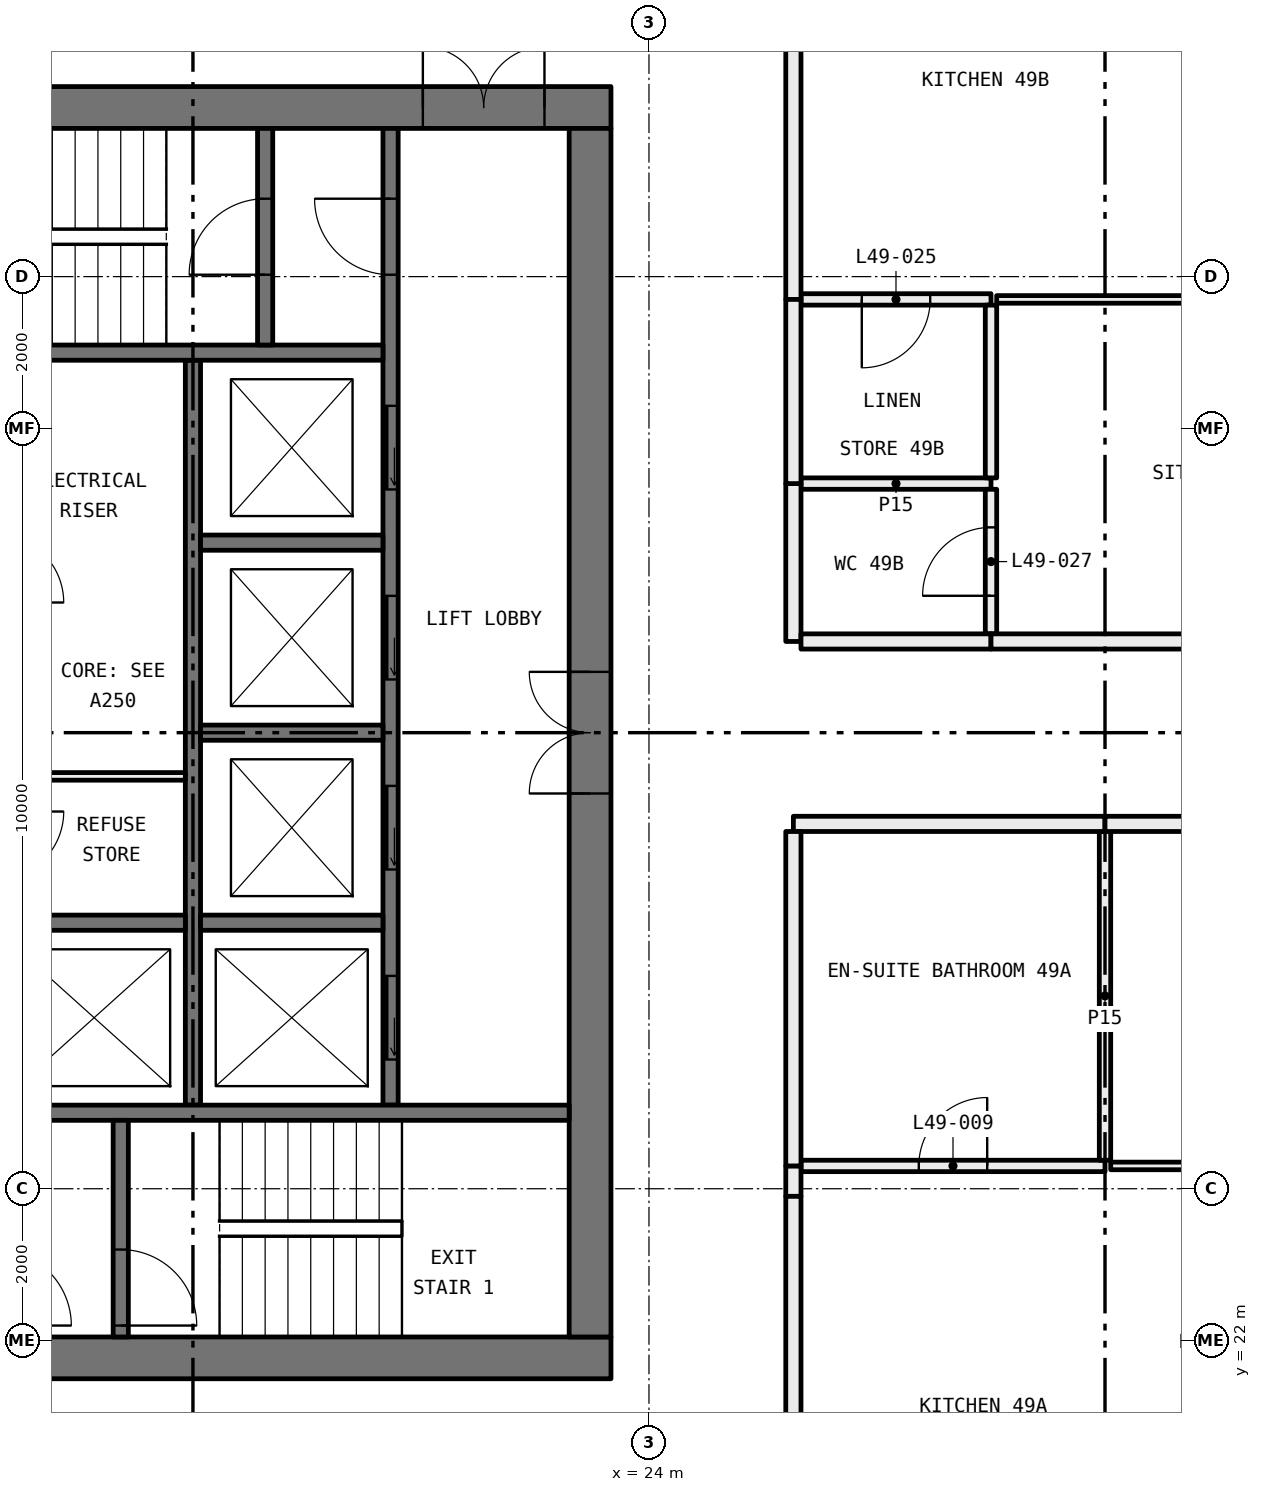
"""IFC4 building model, lengths in metres.
Left out: names, types, materials, properties, quantities, classifications, styles, units other than length and angle.
Written with IfcOpenShell. Run it as: python <this file> out.ifc"""

import sys

from ifc_helpers import new_model, si_unit, direction, frame, frame_2d, origin, place, context, subcontext, project, spatial, rectangle, extrude, element, fill, save


model = new_model("IFC4")
c1 = context("Model", 3, precision=1e-05, world=origin(), true_north=direction((0.0, 1.0)))
c2 = subcontext(c1, "Body", "Model", "MODEL_VIEW")
j1 = project(units=[si_unit("LENGTHUNIT", "METRE"), si_unit("PLANEANGLEUNIT", "RADIAN")], contexts=[c1])
p1 = place(None, origin())
s1 = spatial("IfcSite", under=j1, at=p1, CompositionType="ELEMENT")
p2 = place(p1, origin())
s2 = spatial("IfcBuilding", under=s1, at=p2, CompositionType="ELEMENT")
p3 = place(p2, frame((0.0, 0.0, 185.85)))
s3 = spatial("IfcBuildingStorey", under=s2, at=p3, CompositionType="ELEMENT", Elevation=185.85)
p4 = place(p3, frame((30.0, 24.3, 0.0), z_axis=(0.0, 0.0, 1.0), x_axis=(-1.0, 0.0, 0.0)))
e1 = element("IfcWall", 1, at=p4, inside=s3, PredefinedType="PARTITIONING", context=c2, shape_type="SweptSolid", body=[
    extrude(rectangle(XDim=4.0, YDim=0.15, at=frame_2d((2.0, 0.0))), origin(), (0.0, 0.0, 1.0), 3.05),
])
p5 = place(p4, frame((1.55, 0.0, 0.0)))
e2 = element("IfcOpeningElement", 2, at=p5, cuts=e1, PredefinedType="OPENING", context=c2, shape_type="SweptSolid", body=[
    extrude(rectangle(XDim=0.9, YDim=2.1, at=frame_2d((0.45, 1.05))), frame((0.0, 0.085, 0.0), z_axis=(0.0, -1.0, 0.0), x_axis=(1.0, 0.0, 0.0)), (0.0, 0.0, 1.0), 0.17),
])
p6 = place(p3, frame((31.45, 24.3, 0.0), z_axis=(0.0, 0.0, 1.0), x_axis=(-1.0, 0.0, 0.0)))
e3 = element("IfcWall", 3, at=p6, inside=s3, PredefinedType="PARTITIONING", context=c2, shape_type="SweptSolid", body=[
    extrude(rectangle(XDim=1.375, YDim=0.1, at=frame_2d((0.688, 0.0))), origin(), (0.0, 0.0, 1.0), 3.05),
])
p7 = place(p3, frame((25.9, 24.3, 0.0), z_axis=(0.0, 0.0, 1.0), x_axis=(0.0, -1.0, 0.0)))
e4 = element("IfcWall", 4, at=p7, inside=s3, PredefinedType="PARTITIONING", context=c2, shape_type="SweptSolid", body=[
    extrude(rectangle(XDim=0.4, YDim=0.2, at=frame_2d((0.2, 0.0))), origin(), (0.0, 0.0, 1.0), 2.45),
])
p8 = place(p3, frame((25.9, 23.9, 0.0), z_axis=(0.0, 0.0, 1.0), x_axis=(0.0, -1.0, 0.0)))
e5 = element("IfcWall", 5, at=p8, inside=s3, PredefinedType="PARTITIONING", context=c2, shape_type="SweptSolid", body=[
    extrude(rectangle(XDim=5.8, YDim=0.2, at=frame_2d((2.9, 0.0))), origin(), (0.0, 0.0, 1.0), 3.05),
])
p9 = place(p3, frame((30.0, 24.375, 0.0), z_axis=(0.0, 0.0, 1.0), x_axis=(0.0, 1.0, 0.0)))
e6 = element("IfcWall", 6, at=p9, inside=s3, PredefinedType="PARTITIONING", context=c2, shape_type="SweptSolid", body=[
    extrude(rectangle(XDim=4.325, YDim=0.15, at=frame_2d((2.163, 0.0))), origin(), (0.0, 0.0, 1.0), 3.05),
])
p10 = place(p3, frame((30.0, 28.8, 0.0), z_axis=(0.0, 0.0, 1.0), x_axis=(-1.0, 0.0, 0.0)))
e7 = element("IfcWall", 7, at=p10, inside=s3, PredefinedType="PARTITIONING", context=c2, shape_type="SweptSolid", body=[
    extrude(rectangle(XDim=4.1, YDim=0.2, at=frame_2d((2.05, 0.0))), origin(), (0.0, 0.0, 1.0), 3.05),
])
p11 = place(p3, frame((25.9, 28.7, 0.0), z_axis=(0.0, 0.0, 1.0), x_axis=(0.0, -1.0, 0.0)))
e8 = element("IfcWall", 8, at=p11, inside=s3, PredefinedType="PARTITIONING", context=c2, shape_type="SweptSolid", body=[
    extrude(rectangle(XDim=4.4, YDim=0.2, at=frame_2d((2.2, 0.0))), origin(), (0.0, 0.0, 1.0), 3.05),
])
p12 = place(p3, frame((35.9, 28.8, 0.0), z_axis=(0.0, 0.0, 1.0), x_axis=(-1.0, 0.0, 0.0)))
e9 = element("IfcWall", 9, at=p12, inside=s3, PredefinedType="PARTITIONING", context=c2, shape_type="SweptSolid", body=[
    extrude(rectangle(XDim=5.9, YDim=0.2, at=frame_2d((2.95, 0.0))), origin(), (0.0, 0.0, 1.0), 3.05),
])
p13 = place(p3, frame((26.0, 35.7, 0.0), z_axis=(0.0, 0.0, 1.0), x_axis=(1.0, 0.0, 0.0)))
e10 = element("IfcWall", 10, at=p13, inside=s3, PredefinedType="PARTITIONING", context=c2, shape_type="SweptSolid", body=[
    extrude(rectangle(XDim=2.5, YDim=0.15, at=frame_2d((1.25, 0.0))), origin(), (0.0, 0.0, 1.0), 3.05),
])
p14 = place(p13, frame((0.8, 0.0, 0.0)))
e11 = element("IfcOpeningElement", 11, at=p14, cuts=e10, PredefinedType="OPENING", context=c2, shape_type="SweptSolid", body=[
    extrude(rectangle(XDim=0.9, YDim=2.1, at=frame_2d((0.45, 1.05))), frame((0.0, 0.085, 0.0), z_axis=(0.0, -1.0, 0.0), x_axis=(1.0, 0.0, 0.0)), (0.0, 0.0, 1.0), 0.17),
])
p15 = place(p3, frame((28.575, 35.7, 0.0), z_axis=(0.0, 0.0, 1.0), x_axis=(1.0, 0.0, 0.0)))
e12 = element("IfcWall", 12, at=p15, inside=s3, PredefinedType="PARTITIONING", context=c2, shape_type="SweptSolid", body=[
    extrude(rectangle(XDim=2.875, YDim=0.1, at=frame_2d((1.438, 0.0))), origin(), (0.0, 0.0, 1.0), 3.05),
])
p16 = place(p3, frame((25.9, 41.9, 0.0), z_axis=(0.0, 0.0, 1.0), x_axis=(0.0, -1.0, 0.0)))
e13 = element("IfcWall", 13, at=p16, inside=s3, PredefinedType="PARTITIONING", context=c2, shape_type="SweptSolid", body=[
    extrude(rectangle(XDim=6.2, YDim=0.2, at=frame_2d((3.1, 0.0))), origin(), (0.0, 0.0, 1.0), 2.45),
])
p17 = place(p3, frame((28.5, 33.277, 0.0), z_axis=(0.0, 0.0, 1.0), x_axis=(-1.0, 0.0, 0.0)))
e14 = element("IfcWall", 14, at=p17, inside=s3, PredefinedType="PARTITIONING", context=c2, shape_type="SweptSolid", body=[
    extrude(rectangle(XDim=2.5, YDim=0.15, at=frame_2d((1.25, 0.0))), origin(), (0.0, 0.0, 1.0), 3.05),
])
p18 = place(p3, frame((28.5, 31.3, 0.0), z_axis=(0.0, 0.0, 1.0), x_axis=(0.0, 1.0, 0.0)))
e15 = element("IfcWall", 15, at=p18, inside=s3, PredefinedType="PARTITIONING", context=c2, shape_type="SweptSolid", body=[
    extrude(rectangle(XDim=1.902, YDim=0.15, at=frame_2d((0.951, 0.0))), origin(), (0.0, 0.0, 1.0), 3.05),
])
p19 = place(p18, frame((0.501, 0.0, 0.0)))
e16 = element("IfcOpeningElement", 16, at=p19, cuts=e15, PredefinedType="OPENING", context=c2, shape_type="SweptSolid", body=[
    extrude(rectangle(XDim=0.9, YDim=2.1, at=frame_2d((0.45, 1.05))), frame((0.0, 0.085, 0.0), z_axis=(0.0, -1.0, 0.0), x_axis=(1.0, 0.0, 0.0)), (0.0, 0.0, 1.0), 0.17),
])
p20 = place(p3, frame((25.9, 33.277, 0.0), z_axis=(0.0, 0.0, 1.0), x_axis=(0.0, -1.0, 0.0)))
e17 = element("IfcWall", 17, at=p20, inside=s3, PredefinedType="PARTITIONING", context=c2, shape_type="SweptSolid", body=[
    extrude(rectangle(XDim=2.077, YDim=0.2, at=frame_2d((1.039, 0.0))), origin(), (0.0, 0.0, 1.0), 3.05),
])
p21 = place(p3, frame((26.0, 31.2, 0.0), z_axis=(0.0, 0.0, 1.0), x_axis=(1.0, 0.0, 0.0)))
e18 = element("IfcWall", 18, at=p21, inside=s3, PredefinedType="PARTITIONING", context=c2, shape_type="SweptSolid", body=[
    extrude(rectangle(XDim=2.5, YDim=0.2, at=frame_2d((1.25, 0.0))), origin(), (0.0, 0.0, 1.0), 3.05),
])
p22 = place(p3, frame((28.5, 33.352, 0.0), z_axis=(0.0, 0.0, 1.0), x_axis=(0.0, 1.0, 0.0)))
e19 = element("IfcWall", 19, at=p22, inside=s3, PredefinedType="PARTITIONING", context=c2, shape_type="SweptSolid", body=[
    extrude(rectangle(XDim=2.273, YDim=0.15, at=frame_2d((1.136, 0.0))), origin(), (0.0, 0.0, 1.0), 3.05),
])
p23 = place(p3, frame((25.9, 35.7, 0.0), z_axis=(0.0, 0.0, 1.0), x_axis=(0.0, -1.0, 0.0)))
e20 = element("IfcWall", 20, at=p23, inside=s3, PredefinedType="PARTITIONING", context=c2, shape_type="SweptSolid", body=[
    extrude(rectangle(XDim=2.423, YDim=0.2, at=frame_2d((1.211, 0.0))), origin(), (0.0, 0.0, 1.0), 3.05),
])
p24 = place(p3, frame((28.5, 31.2, 0.0), z_axis=(0.0, 0.0, 1.0), x_axis=(1.0, 0.0, 0.0)))
e21 = element("IfcWall", 21, at=p24, inside=s3, PredefinedType="PARTITIONING", context=c2, shape_type="SweptSolid", body=[
    extrude(rectangle(XDim=7.6, YDim=0.2, at=frame_2d((3.8, 0.0))), origin(), (0.0, 0.0, 1.0), 2.45),
])
p25 = place(p3, frame((12.5, 21.775, 0.0), z_axis=(0.0, 0.0, 1.0), x_axis=(1.0, 0.0, 0.0)))
e22 = element("IfcWall", 22, at=p25, inside=s3, PredefinedType="SHEAR", context=c2, shape_type="SweptSolid", body=[
    extrude(rectangle(XDim=11.0, YDim=0.55, at=frame_2d((5.5, 0.0))), origin(), (0.0, 0.0, 1.0), 3.05),
])
p26 = place(p3, frame((12.5, 38.225, 0.0), z_axis=(0.0, 0.0, 1.0), x_axis=(1.0, 0.0, 0.0)))
e23 = element("IfcWall", 23, at=p26, inside=s3, PredefinedType="SHEAR", context=c2, shape_type="SweptSolid", body=[
    extrude(rectangle(XDim=11.0, YDim=0.55, at=frame_2d((5.5, 0.0))), origin(), (0.0, 0.0, 1.0), 3.05),
])
p27 = place(p26, frame((8.525, 0.0, 0.0)))
e24 = element("IfcOpeningElement", 24, at=p27, cuts=e23, PredefinedType="OPENING", context=c2, shape_type="SweptSolid", body=[
    extrude(rectangle(XDim=1.6, YDim=2.1, at=frame_2d((0.8, 1.05))), frame((0.0, 0.285, 0.0), z_axis=(0.0, -1.0, 0.0), x_axis=(1.0, 0.0, 0.0)), (0.0, 0.0, 1.0), 0.57),
])
p28 = place(p3, frame((23.225, 22.05, 0.0), z_axis=(0.0, 0.0, 1.0), x_axis=(0.0, 1.0, 0.0)))
e25 = element("IfcWall", 25, at=p28, inside=s3, PredefinedType="SHEAR", context=c2, shape_type="SweptSolid", body=[
    extrude(rectangle(XDim=15.9, YDim=0.55, at=frame_2d((7.95, 0.0))), origin(), (0.0, 0.0, 1.0), 3.05),
])
p29 = place(p28, frame((7.15, 0.0, 0.0)))
e26 = element("IfcOpeningElement", 26, at=p29, cuts=e25, PredefinedType="OPENING", context=c2, shape_type="SweptSolid", body=[
    extrude(rectangle(XDim=1.6, YDim=2.1, at=frame_2d((0.8, 1.05))), frame((0.0, 0.285, 0.0), z_axis=(0.0, -1.0, 0.0), x_axis=(1.0, 0.0, 0.0)), (0.0, 0.0, 1.0), 0.57),
])
p30 = place(p3, frame((20.6, 25.1, 0.0), z_axis=(0.0, 0.0, 1.0), x_axis=(0.0, 1.0, 0.0)))
e27 = element("IfcWall", 27, at=p30, inside=s3, PredefinedType="SOLIDWALL", context=c2, shape_type="SweptSolid", body=[
    extrude(rectangle(XDim=12.85, YDim=0.2, at=frame_2d((6.425, 0.0))), origin(), (0.0, 0.0, 1.0), 3.05),
])
p31 = place(p30, frame((0.6, 0.0, 0.0)))
e28 = element("IfcOpeningElement", 28, at=p31, cuts=e27, PredefinedType="OPENING", context=c2, shape_type="SweptSolid", body=[
    extrude(rectangle(XDim=1.1, YDim=2.1, at=frame_2d((0.55, 1.05))), frame((0.0, 0.11, 0.0), z_axis=(0.0, -1.0, 0.0), x_axis=(1.0, 0.0, 0.0)), (0.0, 0.0, 1.0), 0.22),
])
p32 = place(p30, frame((3.1, 0.0, 0.0)))
e29 = element("IfcOpeningElement", 29, at=p32, cuts=e27, PredefinedType="OPENING", context=c2, shape_type="SweptSolid", body=[
    extrude(rectangle(XDim=1.1, YDim=2.1, at=frame_2d((0.55, 1.05))), frame((0.0, 0.11, 0.0), z_axis=(0.0, -1.0, 0.0), x_axis=(1.0, 0.0, 0.0)), (0.0, 0.0, 1.0), 0.22),
])
p33 = place(p30, frame((5.6, 0.0, 0.0)))
e30 = element("IfcOpeningElement", 30, at=p33, cuts=e27, PredefinedType="OPENING", context=c2, shape_type="SweptSolid", body=[
    extrude(rectangle(XDim=1.1, YDim=2.1, at=frame_2d((0.55, 1.05))), frame((0.0, 0.11, 0.0), z_axis=(0.0, -1.0, 0.0), x_axis=(1.0, 0.0, 0.0)), (0.0, 0.0, 1.0), 0.22),
])
p34 = place(p30, frame((8.1, 0.0, 0.0)))
e31 = element("IfcOpeningElement", 31, at=p34, cuts=e27, PredefinedType="OPENING", context=c2, shape_type="SweptSolid", body=[
    extrude(rectangle(XDim=1.1, YDim=2.1, at=frame_2d((0.55, 1.05))), frame((0.0, 0.11, 0.0), z_axis=(0.0, -1.0, 0.0), x_axis=(1.0, 0.0, 0.0)), (0.0, 0.0, 1.0), 0.22),
])
p35 = place(p30, frame((10.925, 0.0, 0.0)))
e32 = element("IfcOpeningElement", 32, at=p35, cuts=e27, PredefinedType="OPENING", context=c2, shape_type="SweptSolid", body=[
    extrude(rectangle(XDim=1.0, YDim=2.1, at=frame_2d((0.5, 1.05))), frame((0.0, 0.11, 0.0), z_axis=(0.0, -1.0, 0.0), x_axis=(1.0, 0.0, 0.0)), (0.0, 0.0, 1.0), 0.22),
])
p36 = place(p3, frame((18.0, 25.1, 0.0), z_axis=(0.0, 0.0, 1.0), x_axis=(0.0, 1.0, 0.0)))
e33 = element("IfcWall", 33, at=p36, inside=s3, PredefinedType="SOLIDWALL", context=c2, shape_type="SweptSolid", body=[
    extrude(rectangle(XDim=9.8, YDim=0.2, at=frame_2d((4.9, 0.0))), origin(), (0.0, 0.0, 1.0), 3.05),
])
for number, where, z_axis, x_axis in (
    (34, (15.5, 25.0, 0.0), (0.0, 0.0, 1.0), (1.0, 0.0, 0.0)),
    (35, (13.05, 35.0, 0.0), (0.0, 0.0, 1.0), (1.0, 0.0, 0.0)),
):
    element("IfcWall", number, at=place(p3, frame(where, z_axis=z_axis, x_axis=x_axis)), inside=s3, PredefinedType="SOLIDWALL", context=c2, shape_type="SweptSolid", body=[
        extrude(rectangle(XDim=7.45, YDim=0.2, at=frame_2d((3.725, 0.0))), origin(), (0.0, 0.0, 1.0), 3.05),
    ])
p37 = place(p3, frame((17.05, 22.05, 0.0), z_axis=(0.0, 0.0, 1.0), x_axis=(0.0, 1.0, 0.0)))
e36 = element("IfcWall", 36, at=p37, inside=s3, PredefinedType="SOLIDWALL", context=c2, shape_type="SweptSolid", body=[
    extrude(rectangle(XDim=2.85, YDim=0.2, at=frame_2d((1.425, 0.0))), origin(), (0.0, 0.0, 1.0), 3.05),
])
p38 = place(p37, frame((0.15, 0.0, 0.0)))
e37 = element("IfcOpeningElement", 37, at=p38, cuts=e36, PredefinedType="OPENING", context=c2, shape_type="SweptSolid", body=[
    extrude(rectangle(XDim=1.0, YDim=2.1, at=frame_2d((0.5, 1.05))), frame((0.0, 0.11, 0.0), z_axis=(0.0, -1.0, 0.0), x_axis=(1.0, 0.0, 0.0)), (0.0, 0.0, 1.0), 0.22),
])
p39 = place(p3, frame((18.95, 35.1, 0.0), z_axis=(0.0, 0.0, 1.0), x_axis=(0.0, 1.0, 0.0)))
e38 = element("IfcWall", 38, at=p39, inside=s3, PredefinedType="SOLIDWALL", context=c2, shape_type="SweptSolid", body=[
    extrude(rectangle(XDim=2.85, YDim=0.2, at=frame_2d((1.425, 0.0))), origin(), (0.0, 0.0, 1.0), 3.05),
])
p40 = place(p39, frame((0.925, 0.0, 0.0)))
e39 = element("IfcOpeningElement", 39, at=p40, cuts=e38, PredefinedType="OPENING", context=c2, shape_type="SweptSolid", body=[
    extrude(rectangle(XDim=1.0, YDim=2.1, at=frame_2d((0.5, 1.05))), frame((0.0, 0.11, 0.0), z_axis=(0.0, -1.0, 0.0), x_axis=(1.0, 0.0, 0.0)), (0.0, 0.0, 1.0), 0.22),
])
for number, where, z_axis, x_axis in (
    (40, (15.5, 27.5, 0.0), (0.0, 0.0, 1.0), (1.0, 0.0, 0.0)),
    (41, (18.1, 27.5, 0.0), (0.0, 0.0, 1.0), (1.0, 0.0, 0.0)),
    (42, (18.1, 30.0, 0.0), (0.0, 0.0, 1.0), (1.0, 0.0, 0.0)),
    (43, (18.1, 32.5, 0.0), (0.0, 0.0, 1.0), (1.0, 0.0, 0.0)),
):
    element("IfcWall", number, at=place(p3, frame(where, z_axis=z_axis, x_axis=x_axis)), inside=s3, PredefinedType="SOLIDWALL", context=c2, shape_type="SweptSolid", body=[
        extrude(rectangle(XDim=2.4, YDim=0.2, at=frame_2d((1.2, 0.0))), origin(), (0.0, 0.0, 1.0), 3.05),
    ])
p41 = place(p3, frame((15.5, 29.425, 0.0), z_axis=(0.0, 0.0, 1.0), x_axis=(1.0, 0.0, 0.0)))
e44 = element("IfcWall", 44, at=p41, inside=s3, PredefinedType="PARTITIONING", context=c2, shape_type="SweptSolid", body=[
    extrude(rectangle(XDim=2.4, YDim=0.1, at=frame_2d((1.2, 0.0))), origin(), (0.0, 0.0, 1.0), 3.05),
])
p42 = place(p5, frame((0.9, 0.0, 0.0), x_axis=(-1.0, 0.0, 0.0)))
e45 = element("IfcDoor", 45, at=p42, inside=s3, OperationType="SINGLE_SWING_LEFT", PredefinedType="DOOR", context=c2, shape_type="SweptSolid", body=[
    extrude(rectangle(XDim=0.9, YDim=2.1, at=frame_2d((0.45, 1.05))), frame((0.0, 0.025, 0.0), z_axis=(0.0, -1.0, 0.0), x_axis=(1.0, 0.0, 0.0)), (0.0, 0.0, 1.0), 0.05),
])
fill(e2, e45)
p43 = place(p14, frame((0.9, 0.0, 0.0), x_axis=(-1.0, 0.0, 0.0)))
e46 = element("IfcDoor", 46, at=p43, inside=s3, OperationType="SINGLE_SWING_LEFT", PredefinedType="DOOR", context=c2, shape_type="SweptSolid", body=[
    extrude(rectangle(XDim=0.9, YDim=2.1, at=frame_2d((0.45, 1.05))), frame((0.0, 0.025, 0.0), z_axis=(0.0, -1.0, 0.0), x_axis=(1.0, 0.0, 0.0)), (0.0, 0.0, 1.0), 0.05),
])
fill(e11, e46)
p44 = place(p19, origin())
e47 = element("IfcDoor", 47, at=p44, inside=s3, OperationType="SINGLE_SWING_RIGHT", PredefinedType="DOOR", context=c2, shape_type="SweptSolid", body=[
    extrude(rectangle(XDim=0.9, YDim=2.1, at=frame_2d((0.45, 1.05))), frame((0.0, 0.025, 0.0), z_axis=(0.0, -1.0, 0.0), x_axis=(1.0, 0.0, 0.0)), (0.0, 0.0, 1.0), 0.05),
])
fill(e16, e47)
p45 = place(p31, origin())
e48 = element("IfcDoor", 48, at=p45, inside=s3, OperationType="SLIDING_TO_LEFT", PredefinedType="DOOR", context=c2, shape_type="SweptSolid", body=[
    extrude(rectangle(XDim=1.1, YDim=2.1, at=frame_2d((0.55, 1.05))), frame((0.0, 0.025, 0.0), z_axis=(0.0, -1.0, 0.0), x_axis=(1.0, 0.0, 0.0)), (0.0, 0.0, 1.0), 0.05),
])
fill(e28, e48)
p46 = place(p32, origin())
e49 = element("IfcDoor", 49, at=p46, inside=s3, OperationType="SLIDING_TO_LEFT", PredefinedType="DOOR", context=c2, shape_type="SweptSolid", body=[
    extrude(rectangle(XDim=1.1, YDim=2.1, at=frame_2d((0.55, 1.05))), frame((0.0, 0.025, 0.0), z_axis=(0.0, -1.0, 0.0), x_axis=(1.0, 0.0, 0.0)), (0.0, 0.0, 1.0), 0.05),
])
fill(e29, e49)
p47 = place(p33, origin())
e50 = element("IfcDoor", 50, at=p47, inside=s3, OperationType="SLIDING_TO_LEFT", PredefinedType="DOOR", context=c2, shape_type="SweptSolid", body=[
    extrude(rectangle(XDim=1.1, YDim=2.1, at=frame_2d((0.55, 1.05))), frame((0.0, 0.025, 0.0), z_axis=(0.0, -1.0, 0.0), x_axis=(1.0, 0.0, 0.0)), (0.0, 0.0, 1.0), 0.05),
])
fill(e30, e50)
p48 = place(p34, origin())
e51 = element("IfcDoor", 51, at=p48, inside=s3, OperationType="SLIDING_TO_LEFT", PredefinedType="DOOR", context=c2, shape_type="SweptSolid", body=[
    extrude(rectangle(XDim=1.1, YDim=2.1, at=frame_2d((0.55, 1.05))), frame((0.0, 0.025, 0.0), z_axis=(0.0, -1.0, 0.0), x_axis=(1.0, 0.0, 0.0)), (0.0, 0.0, 1.0), 0.05),
])
fill(e31, e51)
p49 = place(p38, frame((1.0, 0.0, 0.0), x_axis=(-1.0, 0.0, 0.0)))
e52 = element("IfcDoor", 52, at=p49, inside=s3, OperationType="SINGLE_SWING_LEFT", PredefinedType="DOOR", context=c2, shape_type="SweptSolid", body=[
    extrude(rectangle(XDim=1.0, YDim=2.1, at=frame_2d((0.5, 1.05))), frame((0.0, 0.025, 0.0), z_axis=(0.0, -1.0, 0.0), x_axis=(1.0, 0.0, 0.0)), (0.0, 0.0, 1.0), 0.05),
])
fill(e37, e52)
p50 = place(p35, origin())
e53 = element("IfcDoor", 53, at=p50, inside=s3, OperationType="SINGLE_SWING_LEFT", PredefinedType="DOOR", context=c2, shape_type="SweptSolid", body=[
    extrude(rectangle(XDim=1.0, YDim=2.1, at=frame_2d((0.5, 1.05))), frame((0.0, 0.025, 0.0), z_axis=(0.0, -1.0, 0.0), x_axis=(1.0, 0.0, 0.0)), (0.0, 0.0, 1.0), 0.05),
])
fill(e32, e53)
p51 = place(p40, origin())
e54 = element("IfcDoor", 54, at=p51, inside=s3, OperationType="SINGLE_SWING_RIGHT", PredefinedType="DOOR", context=c2, shape_type="SweptSolid", body=[
    extrude(rectangle(XDim=1.0, YDim=2.1, at=frame_2d((0.5, 1.05))), frame((0.0, 0.025, 0.0), z_axis=(0.0, -1.0, 0.0), x_axis=(1.0, 0.0, 0.0)), (0.0, 0.0, 1.0), 0.05),
])
fill(e39, e54)
p52 = place(p27, origin())
e55 = element("IfcDoor", 55, at=p52, inside=s3, OperationType="DOUBLE_DOOR_SINGLE_SWING", PredefinedType="DOOR", context=c2, shape_type="SweptSolid", body=[
    extrude(rectangle(XDim=1.6, YDim=2.1, at=frame_2d((0.8, 1.05))), frame((0.0, 0.025, 0.0), z_axis=(0.0, -1.0, 0.0), x_axis=(1.0, 0.0, 0.0)), (0.0, 0.0, 1.0), 0.05),
])
fill(e24, e55)
p53 = place(p29, origin())
e56 = element("IfcDoor", 56, at=p53, inside=s3, OperationType="DOUBLE_DOOR_SINGLE_SWING", PredefinedType="DOOR", context=c2, shape_type="SweptSolid", body=[
    extrude(rectangle(XDim=1.6, YDim=2.1, at=frame_2d((0.8, 1.05))), frame((0.0, 0.025, 0.0), z_axis=(0.0, -1.0, 0.0), x_axis=(1.0, 0.0, 0.0)), (0.0, 0.0, 1.0), 0.05),
])
fill(e26, e56)
save(model, sys.argv[1])
